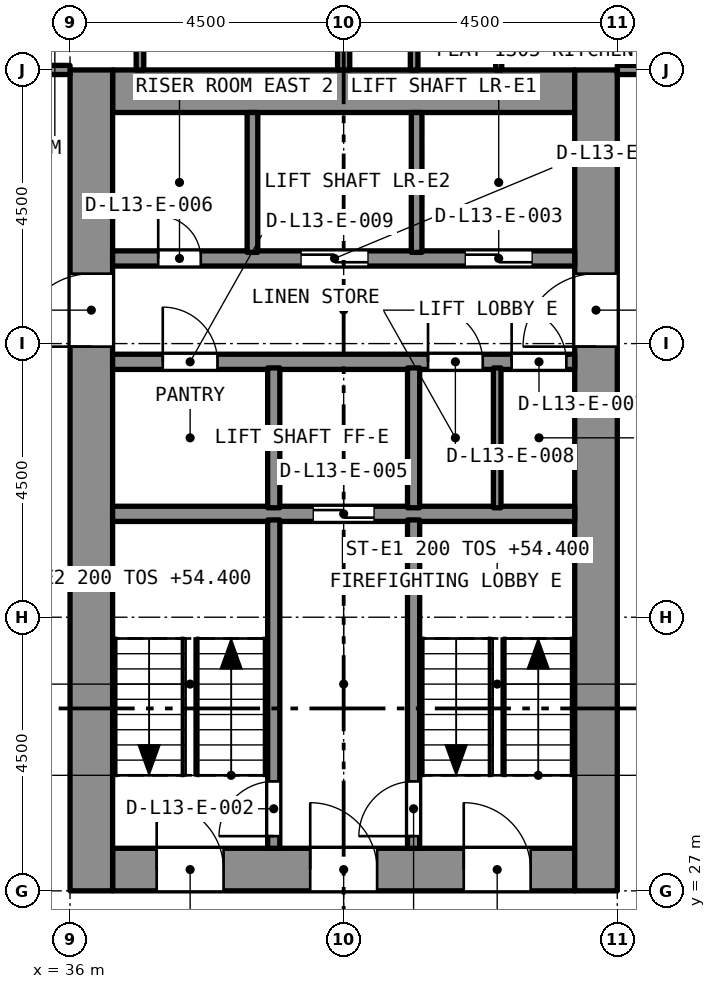
"""IFC4 building model, lengths in metres.
Left out: names, types, materials, properties, quantities, classifications, styles, units other than length and angle.
Written with IfcOpenShell. Run it as: python <this file> out.ifc"""

import sys

from ifc_helpers import new_model, si_unit, direction, frame, frame_2d, origin, place, context, subcontext, project, spatial, rectangle, extrude, element, fill, save


model = new_model("IFC4")
c1 = context("Model", 3, precision=1e-05, world=origin(), true_north=direction((0.0, 1.0)))
c2 = subcontext(c1, "Body", "Model", "MODEL_VIEW")
j1 = project(units=[si_unit("LENGTHUNIT", "METRE"), si_unit("PLANEANGLEUNIT", "RADIAN")], contexts=[c1])
p1 = place(None, origin())
s1 = spatial("IfcSite", under=j1, at=p1, CompositionType="ELEMENT")
p2 = place(p1, origin())
s2 = spatial("IfcBuilding", under=s1, at=p2, CompositionType="ELEMENT")
p3 = place(p2, frame((0.0, 0.0, 52.8)))
s3 = spatial("IfcBuildingStorey", under=s2, at=p3, CompositionType="ELEMENT", Elevation=52.8)
p4 = place(p3, frame((36.7, 27.35, 0.0), z_axis=(0.0, 0.0, 1.0), x_axis=(1.0, 0.0, 0.0)))
e1 = element("IfcWall", 1, at=p4, inside=s3, PredefinedType="SOLIDWALL", context=c2, shape_type="SweptSolid", body=[
    extrude(rectangle(XDim=7.6, YDim=0.7, at=frame_2d((3.8, 0.0))), origin(), (0.0, 0.0, 1.0), 3.2),
])
p5 = place(p4, frame((5.775, 0.0, 0.0)))
e2 = element("IfcOpeningElement", 2, at=p5, cuts=e1, PredefinedType="OPENING", context=c2, shape_type="SweptSolid", body=[
    extrude(rectangle(XDim=1.1, YDim=2.1, at=frame_2d((0.55, 1.05))), frame((0.0, 0.36, 0.0), z_axis=(0.0, -1.0, 0.0), x_axis=(1.0, 0.0, 0.0)), (0.0, 0.0, 1.0), 0.72),
])
p6 = place(p4, frame((3.25, 0.0, 0.0)))
e3 = element("IfcOpeningElement", 3, at=p6, cuts=e1, PredefinedType="OPENING", context=c2, shape_type="SweptSolid", body=[
    extrude(rectangle(XDim=1.1, YDim=2.1, at=frame_2d((0.55, 1.05))), frame((0.0, 0.36, 0.0), z_axis=(0.0, -1.0, 0.0), x_axis=(1.0, 0.0, 0.0)), (0.0, 0.0, 1.0), 0.72),
])
p7 = place(p4, frame((0.725, 0.0, 0.0)))
e4 = element("IfcOpeningElement", 4, at=p7, cuts=e1, PredefinedType="OPENING", context=c2, shape_type="SweptSolid", body=[
    extrude(rectangle(XDim=1.1, YDim=2.1, at=frame_2d((0.55, 1.05))), frame((0.0, 0.36, 0.0), z_axis=(0.0, -1.0, 0.0), x_axis=(1.0, 0.0, 0.0)), (0.0, 0.0, 1.0), 0.72),
])
p8 = place(p3, frame((36.7, 40.15, 0.0), z_axis=(0.0, 0.0, 1.0), x_axis=(1.0, 0.0, 0.0)))
e5 = element("IfcWall", 5, at=p8, inside=s3, PredefinedType="SOLIDWALL", context=c2, shape_type="SweptSolid", body=[
    extrude(rectangle(XDim=7.6, YDim=0.7, at=frame_2d((3.8, 0.0))), origin(), (0.0, 0.0, 1.0), 3.2),
])
p9 = place(p3, frame((36.35, 27.0, 0.0), z_axis=(0.0, 0.0, 1.0), x_axis=(0.0, 1.0, 0.0)))
e6 = element("IfcWall", 6, at=p9, inside=s3, PredefinedType="SOLIDWALL", context=c2, shape_type="SweptSolid", body=[
    extrude(rectangle(XDim=13.5, YDim=0.7, at=frame_2d((6.75, 0.0))), origin(), (0.0, 0.0, 1.0), 3.2),
])
p10 = place(p9, frame((8.95, 0.0, 0.0)))
e7 = element("IfcOpeningElement", 7, at=p10, cuts=e6, PredefinedType="OPENING", context=c2, shape_type="SweptSolid", body=[
    extrude(rectangle(XDim=1.2, YDim=2.1, at=frame_2d((0.6, 1.05))), frame((0.0, 0.36, 0.0), z_axis=(0.0, -1.0, 0.0), x_axis=(1.0, 0.0, 0.0)), (0.0, 0.0, 1.0), 0.72),
])
p11 = place(p3, frame((44.65, 27.0, 0.0), z_axis=(0.0, 0.0, 1.0), x_axis=(0.0, 1.0, 0.0)))
e8 = element("IfcWall", 8, at=p11, inside=s3, PredefinedType="SOLIDWALL", context=c2, shape_type="SweptSolid", body=[
    extrude(rectangle(XDim=13.5, YDim=0.7, at=frame_2d((6.75, 0.0))), origin(), (0.0, 0.0, 1.0), 3.2),
])
p12 = place(p11, frame((8.95, 0.0, 0.0)))
e9 = element("IfcOpeningElement", 9, at=p12, cuts=e8, PredefinedType="OPENING", context=c2, shape_type="SweptSolid", body=[
    extrude(rectangle(XDim=1.2, YDim=2.1, at=frame_2d((0.6, 1.05))), frame((0.0, 0.36, 0.0), z_axis=(0.0, -1.0, 0.0), x_axis=(1.0, 0.0, 0.0)), (0.0, 0.0, 1.0), 0.72),
])
p13 = place(p3, frame((41.659, 40.5, 0.0), z_axis=(0.0, 0.0, 1.0), x_axis=(0.0, 1.0, 0.0)))
e10 = element("IfcWall", 10, at=p13, inside=s3, PredefinedType="PARTITIONING", context=c2, shape_type="SweptSolid", body=[
    extrude(rectangle(XDim=3.198, YDim=0.125, at=frame_2d((1.599, 0.0))), origin(), (0.0, 0.0, 1.0), 2.9),
])
p14 = place(p3, frame((40.5, 40.5, 0.0), z_axis=(0.0, 0.0, 1.0), x_axis=(0.0, 1.0, 0.0)))
e11 = element("IfcWall", 11, at=p14, inside=s3, PredefinedType="PARTITIONING", context=c2, shape_type="SweptSolid", body=[
    extrude(rectangle(XDim=4.34, YDim=0.2, at=frame_2d((2.17, 0.0))), origin(), (0.0, 0.0, 1.0), 2.9),
])
p15 = place(p3, frame((43.05, 40.5, 0.0), z_axis=(0.0, 0.0, 1.0), x_axis=(0.0, 1.0, 0.0)))
e12 = element("IfcWall", 12, at=p15, inside=s3, PredefinedType="PARTITIONING", context=c2, shape_type="SweptSolid", body=[
    extrude(rectangle(XDim=3.21, YDim=0.1, at=frame_2d((1.605, 0.0))), origin(), (0.0, 0.0, 1.0), 2.9),
])
p16 = place(p3, frame((45.0, 40.5, 0.0), z_axis=(0.0, 0.0, 1.0), x_axis=(1.0, 0.0, 0.0)))
e13 = element("IfcWall", 13, at=p16, inside=s3, PredefinedType="PARTITIONING", context=c2, shape_type="SweptSolid", body=[
    extrude(rectangle(XDim=3.8, YDim=0.15, at=frame_2d((1.9, 0.0))), origin(), (0.0, 0.0, 1.0), 2.9),
])
p17 = place(p16, frame((1.75, 0.0, 0.0)))
e14 = element("IfcOpeningElement", 14, at=p17, cuts=e13, PredefinedType="OPENING", context=c2, shape_type="SweptSolid", body=[
    extrude(rectangle(XDim=1.0, YDim=2.1, at=frame_2d((0.5, 1.05))), frame((0.0, 0.085, 0.0), z_axis=(0.0, -1.0, 0.0), x_axis=(1.0, 0.0, 0.0)), (0.0, 0.0, 1.0), 0.17),
])
p18 = place(p3, frame((37.15, 40.5, 0.0), z_axis=(0.0, 0.0, 1.0), x_axis=(0.0, 1.0, 0.0)))
e15 = element("IfcWall", 15, at=p18, inside=s3, PredefinedType="PARTITIONING", context=c2, shape_type="SweptSolid", body=[
    extrude(rectangle(XDim=2.948, YDim=0.125, at=frame_2d((1.474, 0.0))), origin(), (0.0, 0.0, 1.0), 2.9),
])
p19 = place(p3, frame((34.35, 40.5, 0.0), z_axis=(0.0, 0.0, 1.0), x_axis=(1.0, 0.0, 0.0)))
e16 = element("IfcWall", 16, at=p19, inside=s3, PredefinedType="PARTITIONING", context=c2, shape_type="SweptSolid", body=[
    extrude(rectangle(XDim=1.65, YDim=0.15, at=frame_2d((0.825, 0.0))), origin(), (0.0, 0.0, 1.0), 2.9),
])
p20 = place(p3, frame((36.7, 33.2, 0.0), z_axis=(0.0, 0.0, 1.0), x_axis=(1.0, 0.0, 0.0)))
e17 = element("IfcWall", 17, at=p20, inside=s3, PredefinedType="SOLIDWALL", context=c2, shape_type="SweptSolid", body=[
    extrude(rectangle(XDim=7.6, YDim=0.25, at=frame_2d((3.8, 0.0))), origin(), (0.0, 0.0, 1.0), 2.9),
])
p21 = place(p20, frame((3.3, 0.0, 0.0)))
e18 = element("IfcOpeningElement", 18, at=p21, cuts=e17, PredefinedType="OPENING", context=c2, shape_type="SweptSolid", body=[
    extrude(rectangle(XDim=1.0, YDim=2.1, at=frame_2d((0.5, 1.05))), frame((0.0, 0.135, 0.0), z_axis=(0.0, -1.0, 0.0), x_axis=(1.0, 0.0, 0.0)), (0.0, 0.0, 1.0), 0.27),
])
p22 = place(p3, frame((36.7, 35.7, 0.0), z_axis=(0.0, 0.0, 1.0), x_axis=(1.0, 0.0, 0.0)))
e19 = element("IfcWall", 19, at=p22, inside=s3, PredefinedType="SOLIDWALL", context=c2, shape_type="SweptSolid", body=[
    extrude(rectangle(XDim=7.6, YDim=0.25, at=frame_2d((3.8, 0.0))), origin(), (0.0, 0.0, 1.0), 2.9),
])
p23 = place(p22, frame((6.562, 0.0, 0.0)))
e20 = element("IfcOpeningElement", 20, at=p23, cuts=e19, PredefinedType="OPENING", context=c2, shape_type="SweptSolid", body=[
    extrude(rectangle(XDim=0.9, YDim=2.1, at=frame_2d((0.45, 1.05))), frame((0.0, 0.135, 0.0), z_axis=(0.0, -1.0, 0.0), x_axis=(1.0, 0.0, 0.0)), (0.0, 0.0, 1.0), 0.27),
])
p24 = place(p22, frame((5.188, 0.0, 0.0)))
e21 = element("IfcOpeningElement", 21, at=p24, cuts=e19, PredefinedType="OPENING", context=c2, shape_type="SweptSolid", body=[
    extrude(rectangle(XDim=0.9, YDim=2.1, at=frame_2d((0.45, 1.05))), frame((0.0, 0.135, 0.0), z_axis=(0.0, -1.0, 0.0), x_axis=(1.0, 0.0, 0.0)), (0.0, 0.0, 1.0), 0.27),
])
p25 = place(p22, frame((0.825, 0.0, 0.0)))
e22 = element("IfcOpeningElement", 22, at=p25, cuts=e19, PredefinedType="OPENING", context=c2, shape_type="SweptSolid", body=[
    extrude(rectangle(XDim=0.9, YDim=2.1, at=frame_2d((0.45, 1.05))), frame((0.0, 0.135, 0.0), z_axis=(0.0, -1.0, 0.0), x_axis=(1.0, 0.0, 0.0)), (0.0, 0.0, 1.0), 0.27),
])
p26 = place(p3, frame((36.7, 37.4, 0.0), z_axis=(0.0, 0.0, 1.0), x_axis=(1.0, 0.0, 0.0)))
e23 = element("IfcWall", 23, at=p26, inside=s3, PredefinedType="SOLIDWALL", context=c2, shape_type="SweptSolid", body=[
    extrude(rectangle(XDim=7.6, YDim=0.25, at=frame_2d((3.8, 0.0))), origin(), (0.0, 0.0, 1.0), 2.9),
])
p27 = place(p26, frame((5.8, 0.0, 0.0)))
e24 = element("IfcOpeningElement", 24, at=p27, cuts=e23, PredefinedType="OPENING", context=c2, shape_type="SweptSolid", body=[
    extrude(rectangle(XDim=1.1, YDim=2.4, at=frame_2d((0.55, 1.2))), frame((0.0, 0.135, 0.0), z_axis=(0.0, -1.0, 0.0), x_axis=(1.0, 0.0, 0.0)), (0.0, 0.0, 1.0), 0.27),
])
p28 = place(p26, frame((3.1, 0.0, 0.0)))
e25 = element("IfcOpeningElement", 25, at=p28, cuts=e23, PredefinedType="OPENING", context=c2, shape_type="SweptSolid", body=[
    extrude(rectangle(XDim=1.1, YDim=2.4, at=frame_2d((0.55, 1.2))), frame((0.0, 0.135, 0.0), z_axis=(0.0, -1.0, 0.0), x_axis=(1.0, 0.0, 0.0)), (0.0, 0.0, 1.0), 0.27),
])
p29 = place(p26, frame((0.75, 0.0, 0.0)))
e26 = element("IfcOpeningElement", 26, at=p29, cuts=e23, PredefinedType="OPENING", context=c2, shape_type="SweptSolid", body=[
    extrude(rectangle(XDim=0.7, YDim=2.1, at=frame_2d((0.35, 1.05))), frame((0.0, 0.135, 0.0), z_axis=(0.0, -1.0, 0.0), x_axis=(1.0, 0.0, 0.0)), (0.0, 0.0, 1.0), 0.27),
])
p30 = place(p3, frame((41.65, 27.7, 0.0), z_axis=(0.0, 0.0, 1.0), x_axis=(0.0, 1.0, 0.0)))
e27 = element("IfcWall", 27, at=p30, inside=s3, PredefinedType="SOLIDWALL", context=c2, shape_type="SweptSolid", body=[
    extrude(rectangle(XDim=5.4, YDim=0.2, at=frame_2d((2.7, 0.0))), origin(), (0.0, 0.0, 1.0), 2.9),
])
p31 = place(p30, frame((0.2, 0.0, 0.0)))
e28 = element("IfcOpeningElement", 28, at=p31, cuts=e27, PredefinedType="OPENING", context=c2, shape_type="SweptSolid", body=[
    extrude(rectangle(XDim=0.9, YDim=2.1, at=frame_2d((0.45, 1.05))), frame((0.0, 0.11, 0.0), z_axis=(0.0, -1.0, 0.0), x_axis=(1.0, 0.0, 0.0)), (0.0, 0.0, 1.0), 0.22),
])
p32 = place(p3, frame((39.35, 27.7, 0.0), z_axis=(0.0, 0.0, 1.0), x_axis=(0.0, 1.0, 0.0)))
e29 = element("IfcWall", 29, at=p32, inside=s3, PredefinedType="SOLIDWALL", context=c2, shape_type="SweptSolid", body=[
    extrude(rectangle(XDim=5.4, YDim=0.2, at=frame_2d((2.7, 0.0))), origin(), (0.0, 0.0, 1.0), 2.9),
])
p33 = place(p32, frame((0.2, 0.0, 0.0)))
e30 = element("IfcOpeningElement", 30, at=p33, cuts=e29, PredefinedType="OPENING", context=c2, shape_type="SweptSolid", body=[
    extrude(rectangle(XDim=0.9, YDim=2.1, at=frame_2d((0.45, 1.05))), frame((0.0, 0.11, 0.0), z_axis=(0.0, -1.0, 0.0), x_axis=(1.0, 0.0, 0.0)), (0.0, 0.0, 1.0), 0.22),
])
for number, where, z_axis, x_axis in (
    (31, (41.65, 33.3, 0.0), (0.0, 0.0, 1.0), (0.0, 1.0, 0.0)),
    (32, (39.35, 33.3, 0.0), (0.0, 0.0, 1.0), (0.0, 1.0, 0.0)),
):
    element("IfcWall", number, at=place(p3, frame(where, z_axis=z_axis, x_axis=x_axis)), inside=s3, PredefinedType="SOLIDWALL", context=c2, shape_type="SweptSolid", body=[
        extrude(rectangle(XDim=2.3, YDim=0.2, at=frame_2d((1.15, 0.0))), origin(), (0.0, 0.0, 1.0), 2.9),
    ])
for number, where, z_axis, x_axis in (
    (33, (41.7, 37.5, 0.0), (0.0, 0.0, 1.0), (0.0, 1.0, 0.0)),
    (34, (39.0, 37.5, 0.0), (0.0, 0.0, 1.0), (0.0, 1.0, 0.0)),
):
    element("IfcWall", number, at=place(p3, frame(where, z_axis=z_axis, x_axis=x_axis)), inside=s3, PredefinedType="SOLIDWALL", context=c2, shape_type="SweptSolid", body=[
        extrude(rectangle(XDim=2.3, YDim=0.175, at=frame_2d((1.15, 0.0))), origin(), (0.0, 0.0, 1.0), 2.9),
    ])
p34 = place(p3, frame((43.025, 33.3, 0.0), z_axis=(0.0, 0.0, 1.0), x_axis=(0.0, 1.0, 0.0)))
e35 = element("IfcWall", 35, at=p34, inside=s3, PredefinedType="PARTITIONING", context=c2, shape_type="SweptSolid", body=[
    extrude(rectangle(XDim=2.3, YDim=0.125, at=frame_2d((1.15, 0.0))), origin(), (0.0, 0.0, 1.0), 2.9),
])
p35 = place(p31, origin())
e36 = element("IfcDoor", 36, at=p35, inside=s3, OperationType="SINGLE_SWING_LEFT", PredefinedType="DOOR", context=c2, shape_type="SweptSolid", body=[
    extrude(rectangle(XDim=0.9, YDim=2.1, at=frame_2d((0.45, 1.05))), frame((0.0, 0.025, 0.0), z_axis=(0.0, -1.0, 0.0), x_axis=(1.0, 0.0, 0.0)), (0.0, 0.0, 1.0), 0.05),
])
fill(e28, e36)
p36 = place(p33, origin())
e37 = element("IfcDoor", 37, at=p36, inside=s3, OperationType="SINGLE_SWING_LEFT", PredefinedType="DOOR", context=c2, shape_type="SweptSolid", body=[
    extrude(rectangle(XDim=0.9, YDim=2.1, at=frame_2d((0.45, 1.05))), frame((0.0, 0.025, 0.0), z_axis=(0.0, -1.0, 0.0), x_axis=(1.0, 0.0, 0.0)), (0.0, 0.0, 1.0), 0.05),
])
fill(e30, e37)
p37 = place(p27, origin())
e38 = element("IfcDoor", 38, at=p37, inside=s3, OperationType="SLIDING_TO_LEFT", PredefinedType="DOOR", context=c2, shape_type="SweptSolid", body=[
    extrude(rectangle(XDim=1.1, YDim=2.4, at=frame_2d((0.55, 1.2))), frame((0.0, 0.025, 0.0), z_axis=(0.0, -1.0, 0.0), x_axis=(1.0, 0.0, 0.0)), (0.0, 0.0, 1.0), 0.05),
])
fill(e24, e38)
p38 = place(p28, origin())
e39 = element("IfcDoor", 39, at=p38, inside=s3, OperationType="SLIDING_TO_LEFT", PredefinedType="DOOR", context=c2, shape_type="SweptSolid", body=[
    extrude(rectangle(XDim=1.1, YDim=2.4, at=frame_2d((0.55, 1.2))), frame((0.0, 0.025, 0.0), z_axis=(0.0, -1.0, 0.0), x_axis=(1.0, 0.0, 0.0)), (0.0, 0.0, 1.0), 0.05),
])
fill(e25, e39)
p39 = place(p21, origin())
e40 = element("IfcDoor", 40, at=p39, inside=s3, OperationType="SLIDING_TO_LEFT", PredefinedType="DOOR", context=c2, shape_type="SweptSolid", body=[
    extrude(rectangle(XDim=1.0, YDim=2.1, at=frame_2d((0.5, 1.05))), frame((0.0, 0.025, 0.0), z_axis=(0.0, -1.0, 0.0), x_axis=(1.0, 0.0, 0.0)), (0.0, 0.0, 1.0), 0.05),
])
fill(e18, e40)
p40 = place(p29, origin())
e41 = element("IfcDoor", 41, at=p40, inside=s3, OperationType="SINGLE_SWING_LEFT", PredefinedType="DOOR", context=c2, shape_type="SweptSolid", body=[
    extrude(rectangle(XDim=0.7, YDim=2.1, at=frame_2d((0.35, 1.05))), frame((0.0, 0.025, 0.0), z_axis=(0.0, -1.0, 0.0), x_axis=(1.0, 0.0, 0.0)), (0.0, 0.0, 1.0), 0.05),
])
fill(e26, e41)
p41 = place(p23, origin())
e42 = element("IfcDoor", 42, at=p41, inside=s3, OperationType="SINGLE_SWING_LEFT", PredefinedType="DOOR", context=c2, shape_type="SweptSolid", body=[
    extrude(rectangle(XDim=0.9, YDim=2.1, at=frame_2d((0.45, 1.05))), frame((0.0, 0.025, 0.0), z_axis=(0.0, -1.0, 0.0), x_axis=(1.0, 0.0, 0.0)), (0.0, 0.0, 1.0), 0.05),
])
fill(e20, e42)
p42 = place(p24, origin())
e43 = element("IfcDoor", 43, at=p42, inside=s3, OperationType="SINGLE_SWING_LEFT", PredefinedType="DOOR", context=c2, shape_type="SweptSolid", body=[
    extrude(rectangle(XDim=0.9, YDim=2.1, at=frame_2d((0.45, 1.05))), frame((0.0, 0.025, 0.0), z_axis=(0.0, -1.0, 0.0), x_axis=(1.0, 0.0, 0.0)), (0.0, 0.0, 1.0), 0.05),
])
fill(e21, e43)
p43 = place(p25, origin())
e44 = element("IfcDoor", 44, at=p43, inside=s3, OperationType="SINGLE_SWING_LEFT", PredefinedType="DOOR", context=c2, shape_type="SweptSolid", body=[
    extrude(rectangle(XDim=0.9, YDim=2.1, at=frame_2d((0.45, 1.05))), frame((0.0, 0.025, 0.0), z_axis=(0.0, -1.0, 0.0), x_axis=(1.0, 0.0, 0.0)), (0.0, 0.0, 1.0), 0.05),
])
fill(e22, e44)
p44 = place(p5, origin())
e45 = element("IfcDoor", 45, at=p44, inside=s3, OperationType="SINGLE_SWING_LEFT", PredefinedType="DOOR", context=c2, shape_type="SweptSolid", body=[
    extrude(rectangle(XDim=1.1, YDim=2.1, at=frame_2d((0.55, 1.05))), frame((0.0, 0.025, 0.0), z_axis=(0.0, -1.0, 0.0), x_axis=(1.0, 0.0, 0.0)), (0.0, 0.0, 1.0), 0.05),
])
fill(e2, e45)
p45 = place(p6, origin())
e46 = element("IfcDoor", 46, at=p45, inside=s3, OperationType="SINGLE_SWING_LEFT", PredefinedType="DOOR", context=c2, shape_type="SweptSolid", body=[
    extrude(rectangle(XDim=1.1, YDim=2.1, at=frame_2d((0.55, 1.05))), frame((0.0, 0.025, 0.0), z_axis=(0.0, -1.0, 0.0), x_axis=(1.0, 0.0, 0.0)), (0.0, 0.0, 1.0), 0.05),
])
fill(e3, e46)
p46 = place(p7, origin())
e47 = element("IfcDoor", 47, at=p46, inside=s3, OperationType="SINGLE_SWING_LEFT", PredefinedType="DOOR", context=c2, shape_type="SweptSolid", body=[
    extrude(rectangle(XDim=1.1, YDim=2.1, at=frame_2d((0.55, 1.05))), frame((0.0, 0.025, 0.0), z_axis=(0.0, -1.0, 0.0), x_axis=(1.0, 0.0, 0.0)), (0.0, 0.0, 1.0), 0.05),
])
fill(e4, e47)
p47 = place(p10, origin())
e48 = element("IfcDoor", 48, at=p47, inside=s3, OperationType="SINGLE_SWING_LEFT", PredefinedType="DOOR", context=c2, shape_type="SweptSolid", body=[
    extrude(rectangle(XDim=1.2, YDim=2.1, at=frame_2d((0.6, 1.05))), frame((0.0, 0.025, 0.0), z_axis=(0.0, -1.0, 0.0), x_axis=(1.0, 0.0, 0.0)), (0.0, 0.0, 1.0), 0.05),
])
fill(e7, e48)
p48 = place(p12, origin())
e49 = element("IfcDoor", 49, at=p48, inside=s3, OperationType="SINGLE_SWING_LEFT", PredefinedType="DOOR", context=c2, shape_type="SweptSolid", body=[
    extrude(rectangle(XDim=1.2, YDim=2.1, at=frame_2d((0.6, 1.05))), frame((0.0, 0.025, 0.0), z_axis=(0.0, -1.0, 0.0), x_axis=(1.0, 0.0, 0.0)), (0.0, 0.0, 1.0), 0.05),
])
fill(e9, e49)
save(model, sys.argv[1])
